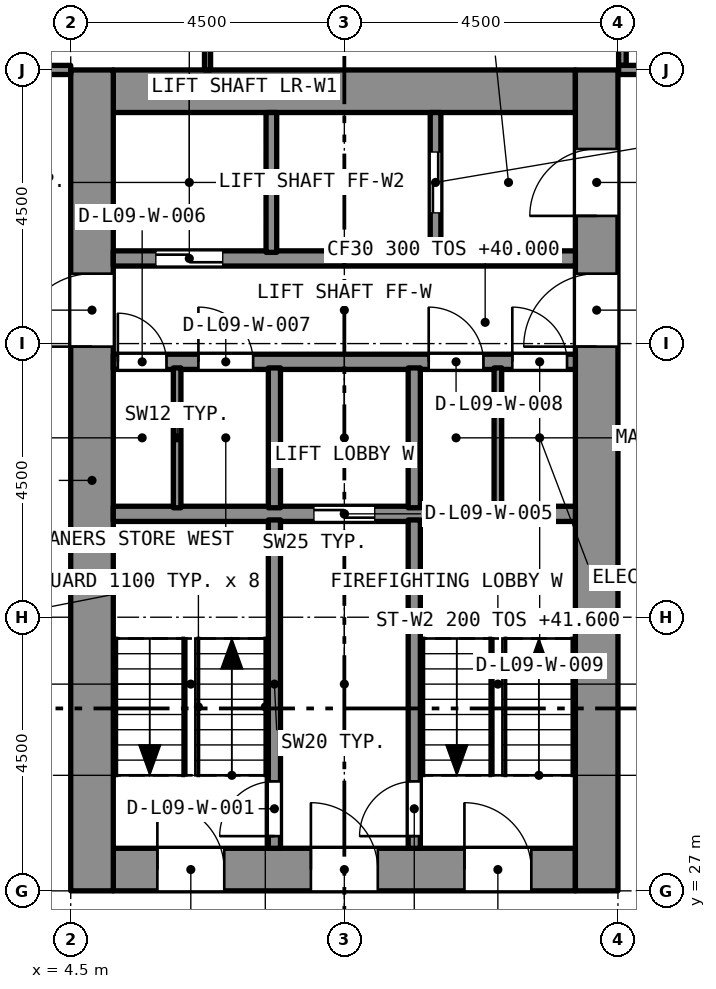
"""IFC4 building model, lengths in metres.
Left out: names, types, materials, properties, quantities, classifications, styles, units other than length and angle.
Written with IfcOpenShell. Run it as: python <this file> out.ifc"""

import sys

from ifc_helpers import new_model, si_unit, direction, frame, frame_2d, origin, place, context, subcontext, project, spatial, rectangle, extrude, element, fill, save


model = new_model("IFC4")
c1 = context("Model", 3, precision=1e-05, world=origin(), true_north=direction((0.0, 1.0)))
c2 = subcontext(c1, "Body", "Model", "MODEL_VIEW")
j1 = project(units=[si_unit("LENGTHUNIT", "METRE"), si_unit("PLANEANGLEUNIT", "RADIAN")], contexts=[c1])
p1 = place(None, origin())
s1 = spatial("IfcSite", under=j1, at=p1, CompositionType="ELEMENT")
p2 = place(p1, origin())
s2 = spatial("IfcBuilding", under=s1, at=p2, CompositionType="ELEMENT")
p3 = place(p2, frame((0.0, 0.0, 40.0)))
s3 = spatial("IfcBuildingStorey", under=s2, at=p3, CompositionType="ELEMENT", Elevation=40.0)
p4 = place(p3, frame((5.2, 27.35, 0.0), z_axis=(0.0, 0.0, 1.0), x_axis=(1.0, 0.0, 0.0)))
e1 = element("IfcWall", 1, at=p4, inside=s3, PredefinedType="SOLIDWALL", context=c2, shape_type="SweptSolid", body=[
    extrude(rectangle(XDim=7.6, YDim=0.7, at=frame_2d((3.8, 0.0))), origin(), (0.0, 0.0, 1.0), 3.2),
])
p5 = place(p4, frame((0.725, 0.0, 0.0)))
e2 = element("IfcOpeningElement", 2, at=p5, cuts=e1, PredefinedType="OPENING", context=c2, shape_type="SweptSolid", body=[
    extrude(rectangle(XDim=1.1, YDim=2.1, at=frame_2d((0.55, 1.05))), frame((0.0, 0.36, 0.0), z_axis=(0.0, -1.0, 0.0), x_axis=(1.0, 0.0, 0.0)), (0.0, 0.0, 1.0), 0.72),
])
p6 = place(p4, frame((3.25, 0.0, 0.0)))
e3 = element("IfcOpeningElement", 3, at=p6, cuts=e1, PredefinedType="OPENING", context=c2, shape_type="SweptSolid", body=[
    extrude(rectangle(XDim=1.1, YDim=2.1, at=frame_2d((0.55, 1.05))), frame((0.0, 0.36, 0.0), z_axis=(0.0, -1.0, 0.0), x_axis=(1.0, 0.0, 0.0)), (0.0, 0.0, 1.0), 0.72),
])
p7 = place(p4, frame((5.775, 0.0, 0.0)))
e4 = element("IfcOpeningElement", 4, at=p7, cuts=e1, PredefinedType="OPENING", context=c2, shape_type="SweptSolid", body=[
    extrude(rectangle(XDim=1.1, YDim=2.1, at=frame_2d((0.55, 1.05))), frame((0.0, 0.36, 0.0), z_axis=(0.0, -1.0, 0.0), x_axis=(1.0, 0.0, 0.0)), (0.0, 0.0, 1.0), 0.72),
])
p8 = place(p3, frame((5.2, 40.15, 0.0), z_axis=(0.0, 0.0, 1.0), x_axis=(1.0, 0.0, 0.0)))
e5 = element("IfcWall", 5, at=p8, inside=s3, PredefinedType="SOLIDWALL", context=c2, shape_type="SweptSolid", body=[
    extrude(rectangle(XDim=7.6, YDim=0.7, at=frame_2d((3.8, 0.0))), origin(), (0.0, 0.0, 1.0), 3.2),
])
p9 = place(p3, frame((4.85, 27.0, 0.0), z_axis=(0.0, 0.0, 1.0), x_axis=(0.0, 1.0, 0.0)))
e6 = element("IfcWall", 6, at=p9, inside=s3, PredefinedType="SOLIDWALL", context=c2, shape_type="SweptSolid", body=[
    extrude(rectangle(XDim=13.5, YDim=0.7, at=frame_2d((6.75, 0.0))), origin(), (0.0, 0.0, 1.0), 3.2),
])
p10 = place(p9, frame((8.95, 0.0, 0.0)))
e7 = element("IfcOpeningElement", 7, at=p10, cuts=e6, PredefinedType="OPENING", context=c2, shape_type="SweptSolid", body=[
    extrude(rectangle(XDim=1.2, YDim=2.1, at=frame_2d((0.6, 1.05))), frame((0.0, 0.36, 0.0), z_axis=(0.0, -1.0, 0.0), x_axis=(1.0, 0.0, 0.0)), (0.0, 0.0, 1.0), 0.72),
])
p11 = place(p3, frame((13.15, 27.0, 0.0), z_axis=(0.0, 0.0, 1.0), x_axis=(0.0, 1.0, 0.0)))
e8 = element("IfcWall", 8, at=p11, inside=s3, PredefinedType="SOLIDWALL", context=c2, shape_type="SweptSolid", body=[
    extrude(rectangle(XDim=13.5, YDim=0.7, at=frame_2d((6.75, 0.0))), origin(), (0.0, 0.0, 1.0), 3.2),
])
p12 = place(p11, frame((11.1, 0.0, 0.0)))
e9 = element("IfcOpeningElement", 9, at=p12, cuts=e8, PredefinedType="OPENING", context=c2, shape_type="SweptSolid", body=[
    extrude(rectangle(XDim=1.1, YDim=2.1, at=frame_2d((0.55, 1.05))), frame((0.0, 0.36, 0.0), z_axis=(0.0, -1.0, 0.0), x_axis=(1.0, 0.0, 0.0)), (0.0, 0.0, 1.0), 0.72),
])
p13 = place(p11, frame((8.95, 0.0, 0.0)))
e10 = element("IfcOpeningElement", 10, at=p13, cuts=e8, PredefinedType="OPENING", context=c2, shape_type="SweptSolid", body=[
    extrude(rectangle(XDim=1.2, YDim=2.1, at=frame_2d((0.6, 1.05))), frame((0.0, 0.36, 0.0), z_axis=(0.0, -1.0, 0.0), x_axis=(1.0, 0.0, 0.0)), (0.0, 0.0, 1.0), 0.72),
])
p14 = place(p3, frame((13.573, 40.575, 0.0), z_axis=(0.0, 0.0, 1.0), x_axis=(0.0, 1.0, 0.0)))
e11 = element("IfcWall", 11, at=p14, inside=s3, PredefinedType="PARTITIONING", context=c2, shape_type="SweptSolid", body=[
    extrude(rectangle(XDim=3.083, YDim=0.125, at=frame_2d((1.541, 0.0))), origin(), (0.0, 0.0, 1.0), 2.9),
])
p15 = place(p3, frame((13.511, 40.5, 0.0), z_axis=(0.0, 0.0, 1.0), x_axis=(1.0, 0.0, 0.0)))
e12 = element("IfcWall", 12, at=p15, inside=s3, PredefinedType="PARTITIONING", context=c2, shape_type="SweptSolid", body=[
    extrude(rectangle(XDim=3.789, YDim=0.15, at=frame_2d((1.895, 0.0))), origin(), (0.0, 0.0, 1.0), 2.9),
])
p16 = place(p3, frame((6.75, 40.5, 0.0), z_axis=(0.0, 0.0, 1.0), x_axis=(0.0, 1.0, 0.0)))
e13 = element("IfcWall", 13, at=p16, inside=s3, PredefinedType="PARTITIONING", context=c2, shape_type="SweptSolid", body=[
    extrude(rectangle(XDim=3.17, YDim=0.1, at=frame_2d((1.585, 0.0))), origin(), (0.0, 0.0, 1.0), 2.9),
])
p17 = place(p3, frame((0.7, 40.5, 0.0), z_axis=(0.0, 0.0, 1.0), x_axis=(1.0, 0.0, 0.0)))
e14 = element("IfcWall", 14, at=p17, inside=s3, PredefinedType="PARTITIONING", context=c2, shape_type="SweptSolid", body=[
    extrude(rectangle(XDim=3.8, YDim=0.15, at=frame_2d((1.9, 0.0))), origin(), (0.0, 0.0, 1.0), 2.9),
])
p18 = place(p17, frame((1.05, 0.0, 0.0)))
e15 = element("IfcOpeningElement", 15, at=p18, cuts=e14, PredefinedType="OPENING", context=c2, shape_type="SweptSolid", body=[
    extrude(rectangle(XDim=1.0, YDim=2.1, at=frame_2d((0.5, 1.05))), frame((0.0, 0.085, 0.0), z_axis=(0.0, -1.0, 0.0), x_axis=(1.0, 0.0, 0.0)), (0.0, 0.0, 1.0), 0.17),
])
p19 = place(p3, frame((5.2, 33.2, 0.0), z_axis=(0.0, 0.0, 1.0), x_axis=(1.0, 0.0, 0.0)))
e16 = element("IfcWall", 16, at=p19, inside=s3, PredefinedType="SOLIDWALL", context=c2, shape_type="SweptSolid", body=[
    extrude(rectangle(XDim=7.6, YDim=0.25, at=frame_2d((3.8, 0.0))), origin(), (0.0, 0.0, 1.0), 2.9),
])
p20 = place(p19, frame((3.3, 0.0, 0.0)))
e17 = element("IfcOpeningElement", 17, at=p20, cuts=e16, PredefinedType="OPENING", context=c2, shape_type="SweptSolid", body=[
    extrude(rectangle(XDim=1.0, YDim=2.1, at=frame_2d((0.5, 1.05))), frame((0.0, 0.135, 0.0), z_axis=(0.0, -1.0, 0.0), x_axis=(1.0, 0.0, 0.0)), (0.0, 0.0, 1.0), 0.27),
])
p21 = place(p3, frame((5.2, 35.7, 0.0), z_axis=(0.0, 0.0, 1.0), x_axis=(1.0, 0.0, 0.0)))
e18 = element("IfcWall", 18, at=p21, inside=s3, PredefinedType="SOLIDWALL", context=c2, shape_type="SweptSolid", body=[
    extrude(rectangle(XDim=7.6, YDim=0.25, at=frame_2d((3.8, 0.0))), origin(), (0.0, 0.0, 1.0), 2.9),
])
p22 = place(p21, frame((0.075, 0.0, 0.0)))
e19 = element("IfcOpeningElement", 19, at=p22, cuts=e18, PredefinedType="OPENING", context=c2, shape_type="SweptSolid", body=[
    extrude(rectangle(XDim=0.8, YDim=2.1, at=frame_2d((0.4, 1.05))), frame((0.0, 0.135, 0.0), z_axis=(0.0, -1.0, 0.0), x_axis=(1.0, 0.0, 0.0)), (0.0, 0.0, 1.0), 0.27),
])
p23 = place(p21, frame((1.4, 0.0, 0.0)))
e20 = element("IfcOpeningElement", 20, at=p23, cuts=e18, PredefinedType="OPENING", context=c2, shape_type="SweptSolid", body=[
    extrude(rectangle(XDim=0.9, YDim=2.1, at=frame_2d((0.45, 1.05))), frame((0.0, 0.135, 0.0), z_axis=(0.0, -1.0, 0.0), x_axis=(1.0, 0.0, 0.0)), (0.0, 0.0, 1.0), 0.27),
])
p24 = place(p21, frame((5.188, 0.0, 0.0)))
e21 = element("IfcOpeningElement", 21, at=p24, cuts=e18, PredefinedType="OPENING", context=c2, shape_type="SweptSolid", body=[
    extrude(rectangle(XDim=0.9, YDim=2.1, at=frame_2d((0.45, 1.05))), frame((0.0, 0.135, 0.0), z_axis=(0.0, -1.0, 0.0), x_axis=(1.0, 0.0, 0.0)), (0.0, 0.0, 1.0), 0.27),
])
p25 = place(p21, frame((6.562, 0.0, 0.0)))
e22 = element("IfcOpeningElement", 22, at=p25, cuts=e18, PredefinedType="OPENING", context=c2, shape_type="SweptSolid", body=[
    extrude(rectangle(XDim=0.9, YDim=2.1, at=frame_2d((0.45, 1.05))), frame((0.0, 0.135, 0.0), z_axis=(0.0, -1.0, 0.0), x_axis=(1.0, 0.0, 0.0)), (0.0, 0.0, 1.0), 0.27),
])
p26 = place(p3, frame((5.2, 37.4, 0.0), z_axis=(0.0, 0.0, 1.0), x_axis=(1.0, 0.0, 0.0)))
e23 = element("IfcWall", 23, at=p26, inside=s3, PredefinedType="SOLIDWALL", context=c2, shape_type="SweptSolid", body=[
    extrude(rectangle(XDim=7.6, YDim=0.25, at=frame_2d((3.8, 0.0))), origin(), (0.0, 0.0, 1.0), 2.9),
])
p27 = place(p26, frame((0.7, 0.0, 0.0)))
e24 = element("IfcOpeningElement", 24, at=p27, cuts=e23, PredefinedType="OPENING", context=c2, shape_type="SweptSolid", body=[
    extrude(rectangle(XDim=1.1, YDim=2.4, at=frame_2d((0.55, 1.2))), frame((0.0, 0.135, 0.0), z_axis=(0.0, -1.0, 0.0), x_axis=(1.0, 0.0, 0.0)), (0.0, 0.0, 1.0), 0.27),
])
p28 = place(p3, frame((7.85, 27.7, 0.0), z_axis=(0.0, 0.0, 1.0), x_axis=(0.0, 1.0, 0.0)))
e25 = element("IfcWall", 25, at=p28, inside=s3, PredefinedType="SOLIDWALL", context=c2, shape_type="SweptSolid", body=[
    extrude(rectangle(XDim=5.4, YDim=0.2, at=frame_2d((2.7, 0.0))), origin(), (0.0, 0.0, 1.0), 2.9),
])
p29 = place(p28, frame((0.2, 0.0, 0.0)))
e26 = element("IfcOpeningElement", 26, at=p29, cuts=e25, PredefinedType="OPENING", context=c2, shape_type="SweptSolid", body=[
    extrude(rectangle(XDim=0.9, YDim=2.1, at=frame_2d((0.45, 1.05))), frame((0.0, 0.11, 0.0), z_axis=(0.0, -1.0, 0.0), x_axis=(1.0, 0.0, 0.0)), (0.0, 0.0, 1.0), 0.22),
])
p30 = place(p3, frame((10.15, 27.7, 0.0), z_axis=(0.0, 0.0, 1.0), x_axis=(0.0, 1.0, 0.0)))
e27 = element("IfcWall", 27, at=p30, inside=s3, PredefinedType="SOLIDWALL", context=c2, shape_type="SweptSolid", body=[
    extrude(rectangle(XDim=5.4, YDim=0.2, at=frame_2d((2.7, 0.0))), origin(), (0.0, 0.0, 1.0), 2.9),
])
p31 = place(p30, frame((0.2, 0.0, 0.0)))
e28 = element("IfcOpeningElement", 28, at=p31, cuts=e27, PredefinedType="OPENING", context=c2, shape_type="SweptSolid", body=[
    extrude(rectangle(XDim=0.9, YDim=2.1, at=frame_2d((0.45, 1.05))), frame((0.0, 0.11, 0.0), z_axis=(0.0, -1.0, 0.0), x_axis=(1.0, 0.0, 0.0)), (0.0, 0.0, 1.0), 0.22),
])
for number, where, z_axis, x_axis in (
    (29, (7.85, 33.3, 0.0), (0.0, 0.0, 1.0), (0.0, 1.0, 0.0)),
    (30, (10.15, 33.3, 0.0), (0.0, 0.0, 1.0), (0.0, 1.0, 0.0)),
):
    element("IfcWall", number, at=place(p3, frame(where, z_axis=z_axis, x_axis=x_axis)), inside=s3, PredefinedType="SOLIDWALL", context=c2, shape_type="SweptSolid", body=[
        extrude(rectangle(XDim=2.3, YDim=0.2, at=frame_2d((1.15, 0.0))), origin(), (0.0, 0.0, 1.0), 2.9),
    ])
p32 = place(p3, frame((7.8, 37.5, 0.0), z_axis=(0.0, 0.0, 1.0), x_axis=(0.0, 1.0, 0.0)))
e31 = element("IfcWall", 31, at=p32, inside=s3, PredefinedType="SOLIDWALL", context=c2, shape_type="SweptSolid", body=[
    extrude(rectangle(XDim=2.3, YDim=0.175, at=frame_2d((1.15, 0.0))), origin(), (0.0, 0.0, 1.0), 2.9),
])
p33 = place(p3, frame((10.5, 37.5, 0.0), z_axis=(0.0, 0.0, 1.0), x_axis=(0.0, 1.0, 0.0)))
e32 = element("IfcWall", 32, at=p33, inside=s3, PredefinedType="SOLIDWALL", context=c2, shape_type="SweptSolid", body=[
    extrude(rectangle(XDim=2.3, YDim=0.175, at=frame_2d((1.15, 0.0))), origin(), (0.0, 0.0, 1.0), 2.9),
])
p34 = place(p33, frame((0.65, 0.0, 0.0)))
e33 = element("IfcOpeningElement", 33, at=p34, cuts=e32, PredefinedType="OPENING", context=c2, shape_type="SweptSolid", body=[
    extrude(rectangle(XDim=1.0, YDim=2.1, at=frame_2d((0.5, 1.05))), frame((0.0, 0.097, 0.0), z_axis=(0.0, -1.0, 0.0), x_axis=(1.0, 0.0, 0.0)), (0.0, 0.0, 1.0), 0.195),
])
for number, where, z_axis, x_axis in (
    (34, (6.25, 33.3, 0.0), (0.0, 0.0, 1.0), (0.0, 1.0, 0.0)),
    (35, (11.525, 33.3, 0.0), (0.0, 0.0, 1.0), (0.0, 1.0, 0.0)),
):
    element("IfcWall", number, at=place(p3, frame(where, z_axis=z_axis, x_axis=x_axis)), inside=s3, PredefinedType="PARTITIONING", context=c2, shape_type="SweptSolid", body=[
        extrude(rectangle(XDim=2.3, YDim=0.125, at=frame_2d((1.15, 0.0))), origin(), (0.0, 0.0, 1.0), 2.9),
    ])
p35 = place(p29, origin())
e36 = element("IfcDoor", 36, at=p35, inside=s3, OperationType="SINGLE_SWING_LEFT", PredefinedType="DOOR", context=c2, shape_type="SweptSolid", body=[
    extrude(rectangle(XDim=0.9, YDim=2.1, at=frame_2d((0.45, 1.05))), frame((0.0, 0.025, 0.0), z_axis=(0.0, -1.0, 0.0), x_axis=(1.0, 0.0, 0.0)), (0.0, 0.0, 1.0), 0.05),
])
fill(e26, e36)
p36 = place(p31, origin())
e37 = element("IfcDoor", 37, at=p36, inside=s3, OperationType="SINGLE_SWING_LEFT", PredefinedType="DOOR", context=c2, shape_type="SweptSolid", body=[
    extrude(rectangle(XDim=0.9, YDim=2.1, at=frame_2d((0.45, 1.05))), frame((0.0, 0.025, 0.0), z_axis=(0.0, -1.0, 0.0), x_axis=(1.0, 0.0, 0.0)), (0.0, 0.0, 1.0), 0.05),
])
fill(e28, e37)
p37 = place(p27, origin())
e38 = element("IfcDoor", 38, at=p37, inside=s3, OperationType="SLIDING_TO_LEFT", PredefinedType="DOOR", context=c2, shape_type="SweptSolid", body=[
    extrude(rectangle(XDim=1.1, YDim=2.4, at=frame_2d((0.55, 1.2))), frame((0.0, 0.025, 0.0), z_axis=(0.0, -1.0, 0.0), x_axis=(1.0, 0.0, 0.0)), (0.0, 0.0, 1.0), 0.05),
])
fill(e24, e38)
p38 = place(p34, origin())
e39 = element("IfcDoor", 39, at=p38, inside=s3, OperationType="SLIDING_TO_LEFT", PredefinedType="DOOR", context=c2, shape_type="SweptSolid", body=[
    extrude(rectangle(XDim=1.0, YDim=2.1, at=frame_2d((0.5, 1.05))), frame((0.0, 0.025, 0.0), z_axis=(0.0, -1.0, 0.0), x_axis=(1.0, 0.0, 0.0)), (0.0, 0.0, 1.0), 0.05),
])
fill(e33, e39)
p39 = place(p20, origin())
e40 = element("IfcDoor", 40, at=p39, inside=s3, OperationType="SLIDING_TO_LEFT", PredefinedType="DOOR", context=c2, shape_type="SweptSolid", body=[
    extrude(rectangle(XDim=1.0, YDim=2.1, at=frame_2d((0.5, 1.05))), frame((0.0, 0.025, 0.0), z_axis=(0.0, -1.0, 0.0), x_axis=(1.0, 0.0, 0.0)), (0.0, 0.0, 1.0), 0.05),
])
fill(e17, e40)
p40 = place(p22, origin())
e41 = element("IfcDoor", 41, at=p40, inside=s3, OperationType="SINGLE_SWING_LEFT", PredefinedType="DOOR", context=c2, shape_type="SweptSolid", body=[
    extrude(rectangle(XDim=0.8, YDim=2.1, at=frame_2d((0.4, 1.05))), frame((0.0, 0.025, 0.0), z_axis=(0.0, -1.0, 0.0), x_axis=(1.0, 0.0, 0.0)), (0.0, 0.0, 1.0), 0.05),
])
fill(e19, e41)
p41 = place(p23, origin())
e42 = element("IfcDoor", 42, at=p41, inside=s3, OperationType="SINGLE_SWING_LEFT", PredefinedType="DOOR", context=c2, shape_type="SweptSolid", body=[
    extrude(rectangle(XDim=0.9, YDim=2.1, at=frame_2d((0.45, 1.05))), frame((0.0, 0.025, 0.0), z_axis=(0.0, -1.0, 0.0), x_axis=(1.0, 0.0, 0.0)), (0.0, 0.0, 1.0), 0.05),
])
fill(e20, e42)
p42 = place(p24, origin())
e43 = element("IfcDoor", 43, at=p42, inside=s3, OperationType="SINGLE_SWING_LEFT", PredefinedType="DOOR", context=c2, shape_type="SweptSolid", body=[
    extrude(rectangle(XDim=0.9, YDim=2.1, at=frame_2d((0.45, 1.05))), frame((0.0, 0.025, 0.0), z_axis=(0.0, -1.0, 0.0), x_axis=(1.0, 0.0, 0.0)), (0.0, 0.0, 1.0), 0.05),
])
fill(e21, e43)
p43 = place(p25, origin())
e44 = element("IfcDoor", 44, at=p43, inside=s3, OperationType="SINGLE_SWING_LEFT", PredefinedType="DOOR", context=c2, shape_type="SweptSolid", body=[
    extrude(rectangle(XDim=0.9, YDim=2.1, at=frame_2d((0.45, 1.05))), frame((0.0, 0.025, 0.0), z_axis=(0.0, -1.0, 0.0), x_axis=(1.0, 0.0, 0.0)), (0.0, 0.0, 1.0), 0.05),
])
fill(e22, e44)
p44 = place(p5, origin())
e45 = element("IfcDoor", 45, at=p44, inside=s3, OperationType="SINGLE_SWING_LEFT", PredefinedType="DOOR", context=c2, shape_type="SweptSolid", body=[
    extrude(rectangle(XDim=1.1, YDim=2.1, at=frame_2d((0.55, 1.05))), frame((0.0, 0.025, 0.0), z_axis=(0.0, -1.0, 0.0), x_axis=(1.0, 0.0, 0.0)), (0.0, 0.0, 1.0), 0.05),
])
fill(e2, e45)
p45 = place(p6, origin())
e46 = element("IfcDoor", 46, at=p45, inside=s3, OperationType="SINGLE_SWING_LEFT", PredefinedType="DOOR", context=c2, shape_type="SweptSolid", body=[
    extrude(rectangle(XDim=1.1, YDim=2.1, at=frame_2d((0.55, 1.05))), frame((0.0, 0.025, 0.0), z_axis=(0.0, -1.0, 0.0), x_axis=(1.0, 0.0, 0.0)), (0.0, 0.0, 1.0), 0.05),
])
fill(e3, e46)
p46 = place(p7, origin())
e47 = element("IfcDoor", 47, at=p46, inside=s3, OperationType="SINGLE_SWING_LEFT", PredefinedType="DOOR", context=c2, shape_type="SweptSolid", body=[
    extrude(rectangle(XDim=1.1, YDim=2.1, at=frame_2d((0.55, 1.05))), frame((0.0, 0.025, 0.0), z_axis=(0.0, -1.0, 0.0), x_axis=(1.0, 0.0, 0.0)), (0.0, 0.0, 1.0), 0.05),
])
fill(e4, e47)
p47 = place(p12, origin())
e48 = element("IfcDoor", 48, at=p47, inside=s3, OperationType="SINGLE_SWING_LEFT", PredefinedType="DOOR", context=c2, shape_type="SweptSolid", body=[
    extrude(rectangle(XDim=1.1, YDim=2.1, at=frame_2d((0.55, 1.05))), frame((0.0, 0.025, 0.0), z_axis=(0.0, -1.0, 0.0), x_axis=(1.0, 0.0, 0.0)), (0.0, 0.0, 1.0), 0.05),
])
fill(e9, e48)
p48 = place(p10, origin())
e49 = element("IfcDoor", 49, at=p48, inside=s3, OperationType="SINGLE_SWING_LEFT", PredefinedType="DOOR", context=c2, shape_type="SweptSolid", body=[
    extrude(rectangle(XDim=1.2, YDim=2.1, at=frame_2d((0.6, 1.05))), frame((0.0, 0.025, 0.0), z_axis=(0.0, -1.0, 0.0), x_axis=(1.0, 0.0, 0.0)), (0.0, 0.0, 1.0), 0.05),
])
fill(e7, e49)
p49 = place(p13, origin())
e50 = element("IfcDoor", 50, at=p49, inside=s3, OperationType="SINGLE_SWING_LEFT", PredefinedType="DOOR", context=c2, shape_type="SweptSolid", body=[
    extrude(rectangle(XDim=1.2, YDim=2.1, at=frame_2d((0.6, 1.05))), frame((0.0, 0.025, 0.0), z_axis=(0.0, -1.0, 0.0), x_axis=(1.0, 0.0, 0.0)), (0.0, 0.0, 1.0), 0.05),
])
fill(e10, e50)
save(model, sys.argv[1])
